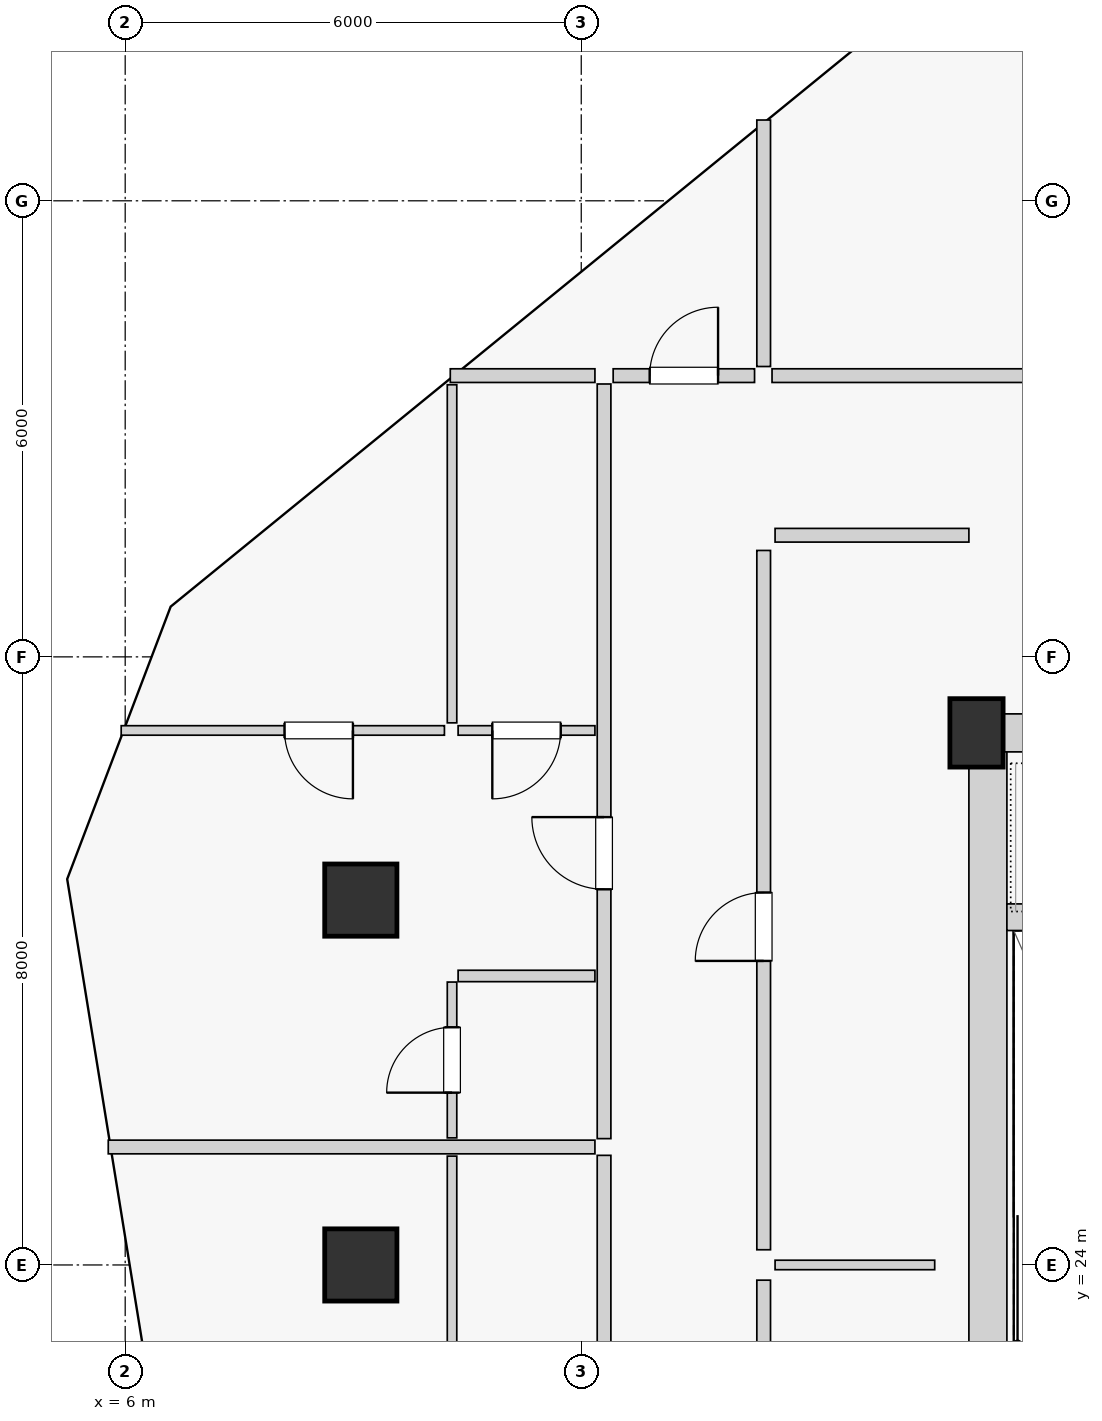
"""IFC4 building model, lengths in metres.
Left out: names, types, materials, properties, quantities, classifications, styles, units other than length and angle.
Written with IfcOpenShell. Run it as: python <this file> out.ifc"""

import sys

from ifc_helpers import new_model, si_unit, direction, frame, frame_2d, origin, origin_2d, place, context, subcontext, project, spatial, rectangle, extrude, source, transform, mapped, element, fill, save


model = new_model("IFC4")
c1 = context("Model", 3, precision=1e-05, world=origin(), true_north=direction((0.0, 1.0)))
c2 = subcontext(c1, "Body", "Model", "MODEL_VIEW")
j1 = project(units=[si_unit("LENGTHUNIT", "METRE"), si_unit("PLANEANGLEUNIT", "RADIAN")], contexts=[c1])
p1 = place(None, origin())
s1 = spatial("IfcSite", under=j1, at=p1, CompositionType="ELEMENT")
p2 = place(p1, origin())
s2 = spatial("IfcBuilding", under=s1, at=p2, CompositionType="ELEMENT")
p3 = place(p2, frame((0.0, 0.0, 174.35)))
s3 = spatial("IfcBuildingStorey", under=s2, at=p3, CompositionType="ELEMENT", Elevation=174.35)
p4 = place(p3, frame((17.2, 31.0, 0.0), z_axis=(0.0, 0.0, 1.0), x_axis=(1.0, 0.0, 0.0)))
e1 = element("IfcColumn", 1, at=p4, inside=s3, PredefinedType="PILASTER", context=c2, shape_type="SweptSolid", body=[
    extrude(rectangle(XDim=0.7, YDim=0.9, at=origin_2d()), origin(), (0.0, 0.0, 1.0), 4.5),
])
for number, where, z_axis, x_axis in (
    (2, (9.1, 28.8, -0.32), (0.0, 0.0, 1.0), (1.0, 0.0, 0.0)),
    (3, (9.1, 24.0, -0.32), (0.0, 0.0, 1.0), (1.0, 0.0, 0.0)),
):
    element("IfcColumn", number, at=place(p3, frame(where, z_axis=z_axis, x_axis=x_axis)), inside=s3, PredefinedType="COLUMN", context=c2, shape_type="SweptSolid", body=[
        extrude(rectangle(XDim=0.95, YDim=0.95, at=origin_2d()), origin(), (0.0, 0.0, 1.0), 4.82),
    ])
p5 = place(p3, frame((17.35, 16.8, 0.0), z_axis=(0.0, 0.0, 1.0), x_axis=(0.0, 1.0, 0.0)))
e4 = element("IfcWall", 4, at=p5, inside=s3, PredefinedType="SHEAR", context=c2, shape_type="SweptSolid", body=[
    extrude(rectangle(XDim=14.2, YDim=0.5, at=frame_2d((7.1, 0.0))), origin(), (0.0, 0.0, 1.0), 4.265),
])
p6 = place(p3, frame((17.2, 31.0, 0.0), z_axis=(0.0, 0.0, 1.0), x_axis=(1.0, 0.0, 0.0)))
e5 = element("IfcWall", 5, at=p6, inside=s3, PredefinedType="SHEAR", context=c2, shape_type="SweptSolid", body=[
    extrude(rectangle(XDim=3.8, YDim=0.5, at=frame_2d((1.9, 0.0))), origin(), (0.0, 0.0, 1.0), 4.265),
])
p7 = place(p6, frame((1.25, 0.0, 0.0)))
e6 = element("IfcOpeningElement", 6, at=p7, cuts=e5, PredefinedType="OPENING", context=c2, shape_type="SweptSolid", body=[
    extrude(rectangle(XDim=0.86, YDim=2.01, at=frame_2d((0.43, 1.005))), frame((0.0, 0.26, 0.0), z_axis=(0.0, -1.0, 0.0), x_axis=(1.0, 0.0, 0.0)), (0.0, 0.0, 1.0), 0.52),
])
p8 = place(p3, frame((17.6, 28.575, 0.0), z_axis=(0.0, 0.0, 1.0), x_axis=(1.0, 0.0, 0.0)))
e7 = element("IfcWall", 7, at=p8, inside=s3, PredefinedType="SHEAR", context=c2, shape_type="SweptSolid", body=[
    extrude(rectangle(XDim=3.375, YDim=0.35, at=frame_2d((1.688, 0.0))), origin(), (0.0, 0.0, 1.0), 4.265),
])
p9 = place(p3, frame((14.4, 14.4, 0.0), z_axis=(0.0, 0.0, 1.0), x_axis=(0.0, 1.0, 0.0)))
e8 = element("IfcWall", 8, at=p9, inside=s3, PredefinedType="PARTITIONING", context=c2, shape_type="SweptSolid", body=[
    extrude(rectangle(XDim=9.4, YDim=0.18, at=frame_2d((4.7, 0.0))), origin(), (0.0, 0.0, 1.0), 4.265),
])
p10 = place(p9, frame((3.8, 0.0, 0.0)))
e9 = element("IfcOpeningElement", 9, at=p10, cuts=e8, PredefinedType="OPENING", context=c2, shape_type="SweptSolid", body=[
    extrude(rectangle(XDim=0.9, YDim=2.01, at=frame_2d((0.45, 1.005))), frame((0.0, 0.1, 0.0), z_axis=(0.0, -1.0, 0.0), x_axis=(1.0, 0.0, 0.0)), (0.0, 0.0, 1.0), 0.2),
])
p11 = place(p3, frame((14.4, 24.2, 0.0), z_axis=(0.0, 0.0, 1.0), x_axis=(0.0, 1.0, 0.0)))
e10 = element("IfcWall", 10, at=p11, inside=s3, PredefinedType="PARTITIONING", context=c2, shape_type="SweptSolid", body=[
    extrude(rectangle(XDim=9.2, YDim=0.18, at=frame_2d((4.6, 0.0))), origin(), (0.0, 0.0, 1.0), 4.265),
])
p12 = place(p11, frame((3.8, 0.0, 0.0)))
e11 = element("IfcOpeningElement", 11, at=p12, cuts=e10, PredefinedType="OPENING", context=c2, shape_type="SweptSolid", body=[
    extrude(rectangle(XDim=0.9, YDim=2.01, at=frame_2d((0.45, 1.005))), frame((0.0, 0.1, 0.0), z_axis=(0.0, -1.0, 0.0), x_axis=(1.0, 0.0, 0.0)), (0.0, 0.0, 1.0), 0.2),
])
p13 = place(p3, frame((14.55, 24.0, 0.0), z_axis=(0.0, 0.0, 1.0), x_axis=(1.0, 0.0, 0.0)))
e12 = element("IfcWall", 12, at=p13, inside=s3, PredefinedType="PARTITIONING", context=c2, shape_type="SweptSolid", body=[
    extrude(rectangle(XDim=2.1, YDim=0.125, at=frame_2d((1.05, 0.0))), origin(), (0.0, 0.0, 1.0), 4.265),
])
p14 = place(p3, frame((14.55, 33.6, 0.0), z_axis=(0.0, 0.0, 1.0), x_axis=(1.0, 0.0, 0.0)))
e13 = element("IfcWall", 13, at=p14, inside=s3, PredefinedType="PARTITIONING", context=c2, shape_type="SweptSolid", body=[
    extrude(rectangle(XDim=2.55, YDim=0.18, at=frame_2d((1.275, 0.0))), origin(), (0.0, 0.0, 1.0), 4.265),
])
p15 = place(p3, frame((14.4, 35.82, 0.0), z_axis=(0.0, 0.0, 1.0), x_axis=(0.0, 1.0, 0.0)))
e14 = element("IfcWall", 14, at=p15, inside=s3, PredefinedType="PARTITIONING", context=c2, shape_type="SweptSolid", body=[
    extrude(rectangle(XDim=3.243, YDim=0.18, at=frame_2d((1.621, 0.0))), origin(), (0.0, 0.0, 1.0), 4.265),
])
p16 = place(p3, frame((14.51, 35.7, 0.0), z_axis=(0.0, 0.0, 1.0), x_axis=(1.0, 0.0, 0.0)))
e15 = element("IfcWall", 15, at=p16, inside=s3, PredefinedType="PARTITIONING", context=c2, shape_type="SweptSolid", body=[
    extrude(rectangle(XDim=10.724, YDim=0.18, at=frame_2d((5.362, 0.0))), origin(), (0.0, 0.0, 1.0), 4.265),
])
p17 = place(p16, frame((4.462, 0.0, 0.0)))
e16 = element("IfcOpeningElement", 16, at=p17, cuts=e15, PredefinedType="OPENING", context=c2, shape_type="SweptSolid", body=[
    extrude(rectangle(XDim=1.8, YDim=2.25, at=frame_2d((0.9, 1.125))), frame((0.0, 0.1, 0.0), z_axis=(0.0, -1.0, 0.0), x_axis=(1.0, 0.0, 0.0)), (0.0, 0.0, 1.0), 0.2),
])
p18 = place(p3, frame((12.18, 35.7, 0.0), z_axis=(0.0, 0.0, 1.0), x_axis=(-1.0, 0.0, 0.0)))
e17 = element("IfcWall", 17, at=p18, inside=s3, PredefinedType="PARTITIONING", context=c2, shape_type="SweptSolid", body=[
    extrude(rectangle(XDim=1.903, YDim=0.18, at=frame_2d((0.951, 0.0))), origin(), (0.0, 0.0, 1.0), 4.265),
])
p19 = place(p3, frame((12.3, 12.21, 0.0), z_axis=(0.0, 0.0, 1.0), x_axis=(0.0, 1.0, 0.0)))
e18 = element("IfcWall", 18, at=p19, inside=s3, PredefinedType="PARTITIONING", context=c2, shape_type="SweptSolid", body=[
    extrude(rectangle(XDim=13.232, YDim=0.18, at=frame_2d((6.616, 0.0))), origin(), (0.0, 0.0, 1.0), 4.265),
])
p20 = place(p19, frame((4.306, 0.0, 0.0)))
e19 = element("IfcOpeningElement", 19, at=p20, cuts=e18, PredefinedType="OPENING", context=c2, shape_type="SweptSolid", body=[
    extrude(rectangle(XDim=0.95, YDim=2.02, at=frame_2d((0.475, 1.01))), frame((0.0, 0.1, 0.0), z_axis=(0.0, -1.0, 0.0), x_axis=(1.0, 0.0, 0.0)), (0.0, 0.0, 1.0), 0.2),
])
p21 = place(p3, frame((10.3, 19.733, 0.0), z_axis=(0.0, 0.0, 1.0), x_axis=(0.0, 1.0, 0.0)))
e20 = element("IfcWall", 20, at=p21, inside=s3, PredefinedType="PARTITIONING", context=c2, shape_type="SweptSolid", body=[
    extrude(rectangle(XDim=5.699, YDim=0.125, at=frame_2d((2.85, 0.0))), origin(), (0.0, 0.0, 1.0), 4.265),
])
p22 = place(p3, frame((12.18, 25.552, 0.0), z_axis=(0.0, 0.0, 1.0), x_axis=(-1.0, 0.0, 0.0)))
e21 = element("IfcWall", 21, at=p22, inside=s3, PredefinedType="PARTITIONING", context=c2, shape_type="SweptSolid", body=[
    extrude(rectangle(XDim=6.403, YDim=0.18, at=frame_2d((3.201, 0.0))), origin(), (0.0, 0.0, 1.0), 4.265),
])
p23 = place(p3, frame((12.3, 25.662, 0.0), z_axis=(0.0, 0.0, 1.0), x_axis=(0.0, 1.0, 0.0)))
e22 = element("IfcWall", 22, at=p23, inside=s3, PredefinedType="PARTITIONING", context=c2, shape_type="SweptSolid", body=[
    extrude(rectangle(XDim=9.928, YDim=0.18, at=frame_2d((4.964, 0.0))), origin(), (0.0, 0.0, 1.0), 4.265),
])
p24 = place(p23, frame((3.28, 0.0, 0.0)))
e23 = element("IfcOpeningElement", 23, at=p24, cuts=e22, PredefinedType="OPENING", context=c2, shape_type="SweptSolid", body=[
    extrude(rectangle(XDim=0.95, YDim=2.02, at=frame_2d((0.475, 1.01))), frame((0.0, 0.1, 0.0), z_axis=(0.0, -1.0, 0.0), x_axis=(1.0, 0.0, 0.0)), (0.0, 0.0, 1.0), 0.2),
])
p25 = place(p3, frame((12.18, 27.802, 0.0), z_axis=(0.0, 0.0, 1.0), x_axis=(-1.0, 0.0, 0.0)))
e24 = element("IfcWall", 24, at=p25, inside=s3, PredefinedType="PARTITIONING", context=c2, shape_type="SweptSolid", body=[
    extrude(rectangle(XDim=1.8, YDim=0.15, at=frame_2d((0.9, 0.0))), origin(), (0.0, 0.0, 1.0), 4.265),
])
p26 = place(p3, frame((10.3, 25.672, 0.0), z_axis=(0.0, 0.0, 1.0), x_axis=(0.0, 1.0, 0.0)))
e25 = element("IfcWall", 25, at=p26, inside=s3, PredefinedType="PARTITIONING", context=c2, shape_type="SweptSolid", body=[
    extrude(rectangle(XDim=2.05, YDim=0.125, at=frame_2d((1.025, 0.0))), origin(), (0.0, 0.0, 1.0), 4.265),
])
p27 = place(p26, frame((0.595, 0.0, 0.0)))
e26 = element("IfcOpeningElement", 26, at=p27, cuts=e25, PredefinedType="OPENING", context=c2, shape_type="SweptSolid", body=[
    extrude(rectangle(XDim=0.86, YDim=2.01, at=frame_2d((0.43, 1.005))), frame((0.0, 0.073, 0.0), z_axis=(0.0, -1.0, 0.0), x_axis=(1.0, 0.0, 0.0)), (0.0, 0.0, 1.0), 0.145),
])
p28 = place(p3, frame((12.18, 31.032, 0.0), z_axis=(0.0, 0.0, 1.0), x_axis=(-1.0, 0.0, 0.0)))
e27 = element("IfcWall", 27, at=p28, inside=s3, PredefinedType="PARTITIONING", context=c2, shape_type="SweptSolid", body=[
    extrude(rectangle(XDim=1.8, YDim=0.125, at=frame_2d((0.9, 0.0))), origin(), (0.0, 0.0, 1.0), 4.265),
])
p29 = place(p28, frame((0.45, 0.0, 0.0)))
e28 = element("IfcOpeningElement", 28, at=p29, cuts=e27, PredefinedType="OPENING", context=c2, shape_type="SweptSolid", body=[
    extrude(rectangle(XDim=0.9, YDim=2.01, at=frame_2d((0.45, 1.005))), frame((0.0, 0.073, 0.0), z_axis=(0.0, -1.0, 0.0), x_axis=(1.0, 0.0, 0.0)), (0.0, 0.0, 1.0), 0.145),
])
p30 = place(p3, frame((10.3, 31.132, 0.0), z_axis=(0.0, 0.0, 1.0), x_axis=(0.0, 1.0, 0.0)))
e29 = element("IfcWall", 29, at=p30, inside=s3, PredefinedType="PARTITIONING", context=c2, shape_type="SweptSolid", body=[
    extrude(rectangle(XDim=4.448, YDim=0.125, at=frame_2d((2.224, 0.0))), origin(), (0.0, 0.0, 1.0), 4.265),
])
p31 = place(p3, frame((10.2, 31.032, 0.0), z_axis=(0.0, 0.0, 1.0), x_axis=(-1.0, 0.0, 0.0)))
e30 = element("IfcWall", 30, at=p31, inside=s3, PredefinedType="PARTITIONING", context=c2, shape_type="SweptSolid", body=[
    extrude(rectangle(XDim=4.252, YDim=0.125, at=frame_2d((2.126, 0.0))), origin(), (0.0, 0.0, 1.0), 4.265),
])
p32 = place(p31, frame((1.204, 0.0, 0.0)))
e31 = element("IfcOpeningElement", 31, at=p32, cuts=e30, PredefinedType="OPENING", context=c2, shape_type="SweptSolid", body=[
    extrude(rectangle(XDim=0.9, YDim=2.01, at=frame_2d((0.45, 1.005))), frame((0.0, 0.073, 0.0), z_axis=(0.0, -1.0, 0.0), x_axis=(1.0, 0.0, 0.0)), (0.0, 0.0, 1.0), 0.145),
])
p33 = place(p3, frame((12.42, 35.7, 0.0), z_axis=(0.0, 0.0, 1.0), x_axis=(1.0, 0.0, 0.0)))
e32 = element("IfcWall", 32, at=p33, inside=s3, PredefinedType="PARTITIONING", context=c2, shape_type="SweptSolid", body=[
    extrude(rectangle(XDim=1.86, YDim=0.18, at=frame_2d((0.93, 0.0))), origin(), (0.0, 0.0, 1.0), 4.265),
])
p34 = place(p33, frame((0.48, 0.0, 0.0)))
e33 = element("IfcOpeningElement", 33, at=p34, cuts=e32, PredefinedType="OPENING", context=c2, shape_type="SweptSolid", body=[
    extrude(rectangle(XDim=0.9, YDim=2.01, at=frame_2d((0.45, 1.005))), frame((0.0, 0.1, 0.0), z_axis=(0.0, -1.0, 0.0), x_axis=(1.0, 0.0, 0.0)), (0.0, 0.0, 1.0), 0.2),
])
m1 = source(origin(), c2, "Body", "SweptSolid", [
    extrude(rectangle(XDim=0.9, YDim=2.01, at=frame_2d((0.45, 1.005))), frame((0.0, 0.025, 0.0), z_axis=(0.0, -1.0, 0.0), x_axis=(1.0, 0.0, 0.0)), (0.0, 0.0, 1.0), 0.05),
])
p35 = place(p12, origin())
e34 = element("IfcDoor", 34, at=p35, inside=s3, OperationType="SINGLE_SWING_LEFT", PredefinedType="DOOR", context=c2, shape_type="MappedRepresentation", body=[
    mapped(m1, transform((0.0, 0.0, 0.0), scale=1.0)),
])
fill(e11, e34)
m2 = source(origin(), c2, "Body", "SweptSolid", [
    extrude(rectangle(XDim=0.95, YDim=2.02, at=frame_2d((0.475, 1.01))), frame((0.0, 0.025, 0.0), z_axis=(0.0, -1.0, 0.0), x_axis=(1.0, 0.0, 0.0)), (0.0, 0.0, 1.0), 0.05),
])
p36 = place(p24, origin())
e35 = element("IfcDoor", 35, at=p36, inside=s3, OperationType="SINGLE_SWING_RIGHT", PredefinedType="DOOR", context=c2, shape_type="MappedRepresentation", body=[
    mapped(m2, transform((0.0, 0.0, 0.0), scale=1.0)),
])
fill(e23, e35)
m3 = source(origin(), c2, "Body", "SweptSolid", [
    extrude(rectangle(XDim=0.86, YDim=2.01, at=frame_2d((0.43, 1.005))), frame((0.0, 0.025, 0.0), z_axis=(0.0, -1.0, 0.0), x_axis=(1.0, 0.0, 0.0)), (0.0, 0.0, 1.0), 0.05),
])
p37 = place(p27, origin())
e36 = element("IfcDoor", 36, at=p37, inside=s3, OperationType="SINGLE_SWING_LEFT", PredefinedType="DOOR", context=c2, shape_type="MappedRepresentation", body=[
    mapped(m3, transform((0.0, 0.0, 0.0), scale=1.0)),
])
fill(e26, e36)
p38 = place(p29, origin())
e37 = element("IfcDoor", 37, at=p38, inside=s3, OperationType="SINGLE_SWING_RIGHT", PredefinedType="DOOR", context=c2, shape_type="MappedRepresentation", body=[
    mapped(m1, transform((0.0, 0.0, 0.0), scale=1.0)),
])
fill(e28, e37)
p39 = place(p32, origin())
e38 = element("IfcDoor", 38, at=p39, inside=s3, OperationType="SINGLE_SWING_LEFT", PredefinedType="DOOR", context=c2, shape_type="MappedRepresentation", body=[
    mapped(m1, transform((0.0, 0.0, 0.0), scale=1.0)),
])
fill(e31, e38)
p40 = place(p34, origin())
e39 = element("IfcDoor", 39, at=p40, inside=s3, OperationType="SINGLE_SWING_RIGHT", PredefinedType="DOOR", context=c2, shape_type="MappedRepresentation", body=[
    mapped(m1, transform((0.0, 0.0, 0.0), scale=1.0)),
])
fill(e33, e39)
save(model, sys.argv[1])
